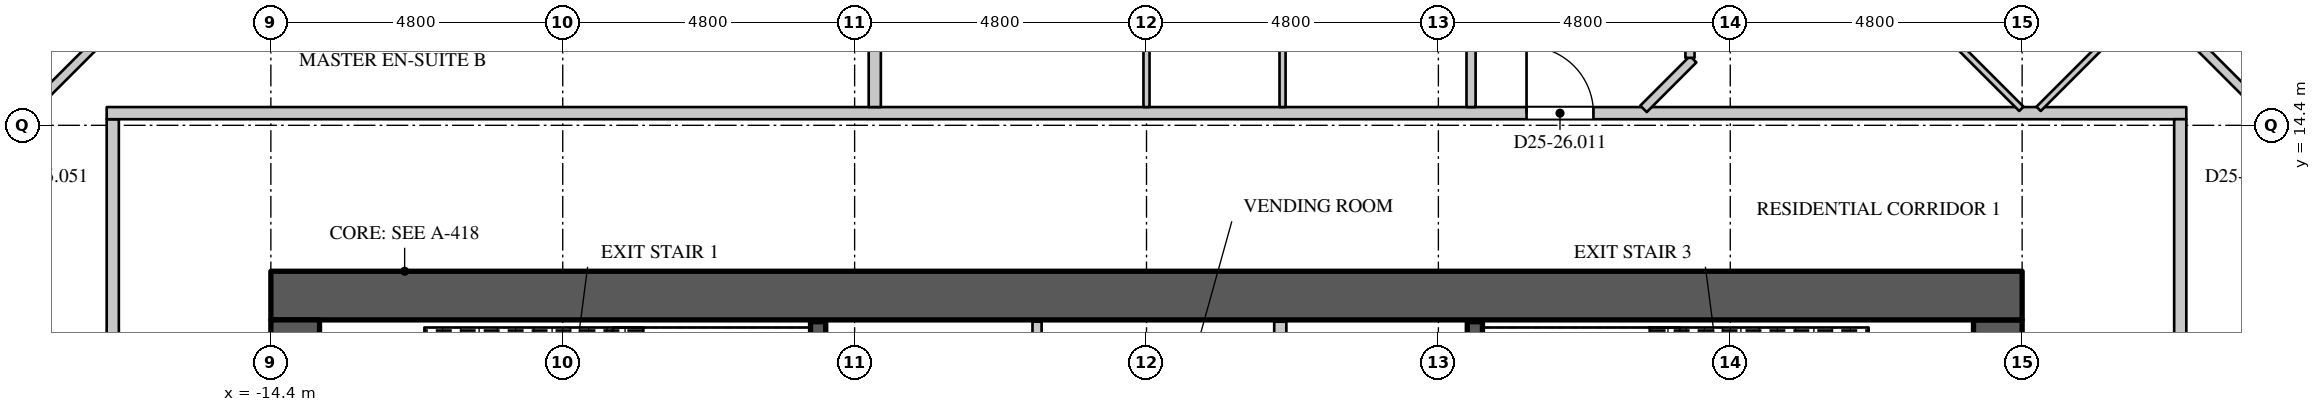
"""IFC4 building model, lengths in metres.
Left out: names, types, materials, properties, quantities, classifications, styles, units other than length and angle.
Written with IfcOpenShell. Run it as: python <this file> out.ifc"""

import sys

from ifc_helpers import new_model, si_unit, direction, frame, frame_2d, origin, place, context, subcontext, project, spatial, rectangle, extrude, element, fill, save


model = new_model("IFC4")
c1 = context("Model", 3, precision=1e-05, world=origin(), true_north=direction((0.0, 1.0)))
c2 = subcontext(c1, "Body", "Model", "MODEL_VIEW")
j1 = project(units=[si_unit("LENGTHUNIT", "METRE"), si_unit("PLANEANGLEUNIT", "RADIAN")], contexts=[c1])
p1 = place(None, origin())
s1 = spatial("IfcSite", under=j1, at=p1, CompositionType="ELEMENT")
p2 = place(p1, origin())
s2 = spatial("IfcBuilding", under=s1, at=p2, CompositionType="ELEMENT")
p3 = place(p2, frame((0.0, 0.0, 110.7)))
s3 = spatial("IfcBuildingStorey", under=s2, at=p3, CompositionType="ELEMENT", Elevation=110.7)
p4 = place(p3, frame((-14.4, 11.6, 0.0), z_axis=(0.0, 0.0, 1.0), x_axis=(1.0, 0.0, 0.0)))
e1 = element("IfcWall", 1, at=p4, inside=s3, PredefinedType="SHEAR", context=c2, shape_type="SweptSolid", body=[
    extrude(rectangle(XDim=28.8, YDim=0.8, at=frame_2d((14.4, 0.0))), origin(), (0.0, 0.0, 1.0), 4.2),
])
p5 = place(p3, frame((14.0, -11.2, 0.0), z_axis=(0.0, 0.0, 1.0), x_axis=(0.0, 1.0, 0.0)))
e2 = element("IfcWall", 2, at=p5, inside=s3, PredefinedType="SHEAR", context=c2, shape_type="SweptSolid", body=[
    extrude(rectangle(XDim=22.4, YDim=0.8, at=frame_2d((11.2, 0.0))), origin(), (0.0, 0.0, 1.0), 4.2),
])
p6 = place(p5, frame((20.25, 0.0, 0.0)))
e3 = element("IfcOpeningElement", 3, at=p6, cuts=e2, PredefinedType="OPENING", context=c2, shape_type="SweptSolid", body=[
    extrude(rectangle(XDim=1.1, YDim=2.2, at=frame_2d((0.55, 1.1))), frame((0.0, 0.41, 0.0), z_axis=(0.0, -1.0, 0.0), x_axis=(1.0, 0.0, 0.0)), (0.0, 0.0, 1.0), 0.82),
])
p7 = place(p5, frame((1.05, 0.0, 0.0)))
e4 = element("IfcOpeningElement", 4, at=p7, cuts=e2, PredefinedType="OPENING", context=c2, shape_type="SweptSolid", body=[
    extrude(rectangle(XDim=1.1, YDim=2.2, at=frame_2d((0.55, 1.1))), frame((0.0, 0.41, 0.0), z_axis=(0.0, -1.0, 0.0), x_axis=(1.0, 0.0, 0.0)), (0.0, 0.0, 1.0), 0.82),
])
p8 = place(p5, frame((14.75, 0.0, 0.0)))
e5 = element("IfcOpeningElement", 5, at=p8, cuts=e2, PredefinedType="OPENING", context=c2, shape_type="SweptSolid", body=[
    extrude(rectangle(XDim=1.5, YDim=2.4, at=frame_2d((0.75, 1.2))), frame((0.0, 0.41, 0.0), z_axis=(0.0, -1.0, 0.0), x_axis=(1.0, 0.0, 0.0)), (0.0, 0.0, 1.0), 0.82),
])
p9 = place(p5, frame((6.15, 0.0, 0.0)))
e6 = element("IfcOpeningElement", 6, at=p9, cuts=e2, PredefinedType="OPENING", context=c2, shape_type="SweptSolid", body=[
    extrude(rectangle(XDim=1.5, YDim=2.4, at=frame_2d((0.75, 1.2))), frame((0.0, 0.41, 0.0), z_axis=(0.0, -1.0, 0.0), x_axis=(1.0, 0.0, 0.0)), (0.0, 0.0, 1.0), 0.82),
])
p10 = place(p3, frame((-14.0, -11.2, 0.0), z_axis=(0.0, 0.0, 1.0), x_axis=(0.0, 1.0, 0.0)))
e7 = element("IfcWall", 7, at=p10, inside=s3, PredefinedType="SHEAR", context=c2, shape_type="SweptSolid", body=[
    extrude(rectangle(XDim=22.4, YDim=0.8, at=frame_2d((11.2, 0.0))), origin(), (0.0, 0.0, 1.0), 4.2),
])
p11 = place(p10, frame((20.25, 0.0, 0.0)))
e8 = element("IfcOpeningElement", 8, at=p11, cuts=e7, PredefinedType="OPENING", context=c2, shape_type="SweptSolid", body=[
    extrude(rectangle(XDim=1.1, YDim=2.2, at=frame_2d((0.55, 1.1))), frame((0.0, 0.41, 0.0), z_axis=(0.0, -1.0, 0.0), x_axis=(1.0, 0.0, 0.0)), (0.0, 0.0, 1.0), 0.82),
])
p12 = place(p10, frame((1.05, 0.0, 0.0)))
e9 = element("IfcOpeningElement", 9, at=p12, cuts=e7, PredefinedType="OPENING", context=c2, shape_type="SweptSolid", body=[
    extrude(rectangle(XDim=1.1, YDim=2.2, at=frame_2d((0.55, 1.1))), frame((0.0, 0.41, 0.0), z_axis=(0.0, -1.0, 0.0), x_axis=(1.0, 0.0, 0.0)), (0.0, 0.0, 1.0), 0.82),
])
p13 = place(p10, frame((15.95, 0.0, 0.0)))
e10 = element("IfcOpeningElement", 10, at=p13, cuts=e7, PredefinedType="OPENING", context=c2, shape_type="SweptSolid", body=[
    extrude(rectangle(XDim=1.5, YDim=2.4, at=frame_2d((0.75, 1.2))), frame((0.0, 0.41, 0.0), z_axis=(0.0, -1.0, 0.0), x_axis=(1.0, 0.0, 0.0)), (0.0, 0.0, 1.0), 0.82),
])
p14 = place(p10, frame((4.95, 0.0, 0.0)))
e11 = element("IfcOpeningElement", 11, at=p14, cuts=e7, PredefinedType="OPENING", context=c2, shape_type="SweptSolid", body=[
    extrude(rectangle(XDim=1.5, YDim=2.4, at=frame_2d((0.75, 1.2))), frame((0.0, 0.41, 0.0), z_axis=(0.0, -1.0, 0.0), x_axis=(1.0, 0.0, 0.0)), (0.0, 0.0, 1.0), 0.82),
])
p15 = place(p3, frame((-17.0, -14.5, 0.0), z_axis=(0.0, 0.0, 1.0), x_axis=(0.0, 1.0, 0.0)))
e12 = element("IfcWall", 12, at=p15, inside=s3, PredefinedType="PARTITIONING", context=c2, shape_type="SweptSolid", body=[
    extrude(rectangle(XDim=29.0, YDim=0.2, at=frame_2d((14.5, 0.0))), origin(), (0.0, 0.0, 1.0), 3.95),
])
p16 = place(p15, frame((11.5, 0.0, 0.0)))
e13 = element("IfcOpeningElement", 13, at=p16, cuts=e12, PredefinedType="OPENING", context=c2, shape_type="SweptSolid", body=[
    extrude(rectangle(XDim=1.1, YDim=2.4, at=frame_2d((0.55, 1.2))), frame((0.0, 0.11, 0.0), z_axis=(0.0, -1.0, 0.0), x_axis=(1.0, 0.0, 0.0)), (0.0, 0.0, 1.0), 0.22),
])
p17 = place(p3, frame((-17.1, 14.6, 0.0), z_axis=(0.0, 0.0, 1.0), x_axis=(1.0, 0.0, 0.0)))
e14 = element("IfcWall", 14, at=p17, inside=s3, PredefinedType="PARTITIONING", context=c2, shape_type="SweptSolid", body=[
    extrude(rectangle(XDim=34.2, YDim=0.2, at=frame_2d((17.1, 0.0))), origin(), (0.0, 0.0, 1.0), 3.95),
])
p18 = place(p17, frame((23.35, 0.0, 0.0)))
e15 = element("IfcOpeningElement", 15, at=p18, cuts=e14, PredefinedType="OPENING", context=c2, shape_type="SweptSolid", body=[
    extrude(rectangle(XDim=1.1, YDim=2.4, at=frame_2d((0.55, 1.2))), frame((0.0, 0.11, 0.0), z_axis=(0.0, -1.0, 0.0), x_axis=(1.0, 0.0, 0.0)), (0.0, 0.0, 1.0), 0.22),
])
p19 = place(p3, frame((17.0, -14.5, 0.0), z_axis=(0.0, 0.0, 1.0), x_axis=(0.0, 1.0, 0.0)))
e16 = element("IfcWall", 16, at=p19, inside=s3, PredefinedType="PARTITIONING", context=c2, shape_type="SweptSolid", body=[
    extrude(rectangle(XDim=29.0, YDim=0.2, at=frame_2d((14.5, 0.0))), origin(), (0.0, 0.0, 1.0), 3.95),
])
p20 = place(p19, frame((11.55, 0.0, 0.0)))
e17 = element("IfcOpeningElement", 17, at=p20, cuts=e16, PredefinedType="OPENING", context=c2, shape_type="SweptSolid", body=[
    extrude(rectangle(XDim=1.1, YDim=2.4, at=frame_2d((0.55, 1.2))), frame((0.0, 0.11, 0.0), z_axis=(0.0, -1.0, 0.0), x_axis=(1.0, 0.0, 0.0)), (0.0, 0.0, 1.0), 0.22),
])
p21 = place(p3, frame((-21.547, 11.471, 0.0), z_axis=(0.0, 0.0, 1.0), x_axis=(0.707106781187, 0.707106781187, 0.0)))
e18 = element("IfcWall", 18, at=p21, inside=s3, PredefinedType="PARTITIONING", context=c2, shape_type="SweptSolid", body=[
    extrude(rectangle(XDim=7.05, YDim=0.15, at=frame_2d((3.525, 0.0))), origin(), (0.0, 0.0, 1.0), 3.95),
])
p22 = place(p21, frame((2.85, 0.0, 0.0)))
e19 = element("IfcOpeningElement", 19, at=p22, cuts=e18, PredefinedType="OPENING", context=c2, shape_type="SweptSolid", body=[
    extrude(rectangle(XDim=0.95, YDim=2.2, at=frame_2d((0.475, 1.1))), frame((0.0, 0.085, 0.0), z_axis=(0.0, -1.0, 0.0), x_axis=(1.0, 0.0, 0.0)), (0.0, 0.0, 1.0), 0.17),
])
p23 = place(p3, frame((-1.8, 5.9, 0.0), z_axis=(0.0, 0.0, 1.0), x_axis=(0.0, 1.0, 0.0)))
e20 = element("IfcWall", 20, at=p23, inside=s3, PredefinedType="PARTITIONING", context=c2, shape_type="SweptSolid", body=[
    extrude(rectangle(XDim=5.27, YDim=0.15, at=frame_2d((2.635, 0.0))), origin(), (0.0, 0.0, 1.0), 3.95),
])
p24 = place(p3, frame((5.337, 14.7, 0.0), z_axis=(0.0, 0.0, 1.0), x_axis=(0.0, 1.0, 0.0)))
e21 = element("IfcWall", 21, at=p24, inside=s3, PredefinedType="PARTITIONING", context=c2, shape_type="SweptSolid", body=[
    extrude(rectangle(XDim=6.025, YDim=0.15, at=frame_2d((3.013, 0.0))), origin(), (0.0, 0.0, 1.0), 3.95),
])
p25 = place(p24, frame((2.55, 0.0, 0.0)))
e22 = element("IfcOpeningElement", 22, at=p25, cuts=e21, PredefinedType="OPENING", context=c2, shape_type="SweptSolid", body=[
    extrude(rectangle(XDim=0.95, YDim=2.2, at=frame_2d((0.475, 1.1))), frame((0.0, 0.085, 0.0), z_axis=(0.0, -1.0, 0.0), x_axis=(1.0, 0.0, 0.0)), (0.0, 0.0, 1.0), 0.17),
])
p26 = place(p3, frame((8.174, 14.671, 0.0), z_axis=(0.0, 0.0, 1.0), x_axis=(0.707106781187, 0.707106781187, 0.0)))
e23 = element("IfcWall", 23, at=p26, inside=s3, PredefinedType="PARTITIONING", context=c2, shape_type="SweptSolid", body=[
    extrude(rectangle(XDim=1.155, YDim=0.15, at=frame_2d((0.578, 0.0))), origin(), (0.0, 0.0, 1.0), 3.95),
])
p27 = place(p3, frame((8.937, 15.509, 0.0), z_axis=(0.0, 0.0, 1.0), x_axis=(0.0, 1.0, 0.0)))
e24 = element("IfcWall", 24, at=p27, inside=s3, PredefinedType="PARTITIONING", context=c2, shape_type="SweptSolid", body=[
    extrude(rectangle(XDim=10.946, YDim=0.15, at=frame_2d((5.473, 0.0))), origin(), (0.0, 0.0, 1.0), 3.95),
])
p28 = place(p27, frame((2.1, 0.0, 0.0)))
e25 = element("IfcOpeningElement", 25, at=p28, cuts=e24, PredefinedType="OPENING", context=c2, shape_type="SweptSolid", body=[
    extrude(rectangle(XDim=0.95, YDim=2.2, at=frame_2d((0.475, 1.1))), frame((0.0, 0.085, 0.0), z_axis=(0.0, -1.0, 0.0), x_axis=(1.0, 0.0, 0.0)), (0.0, 0.0, 1.0), 0.17),
])
p29 = place(p27, frame((7.75, 0.0, 0.0)))
e26 = element("IfcOpeningElement", 26, at=p29, cuts=e24, PredefinedType="OPENING", context=c2, shape_type="SweptSolid", body=[
    extrude(rectangle(XDim=1.5, YDim=2.2, at=frame_2d((0.75, 1.1))), frame((0.0, 0.085, 0.0), z_axis=(0.0, -1.0, 0.0), x_axis=(1.0, 0.0, 0.0)), (0.0, 0.0, 1.0), 0.17),
])
p30 = place(p3, frame((16.562, 16.456, 0.0), z_axis=(0.0, 0.0, 1.0), x_axis=(0.707123735134, -0.707089826832, 0.0)))
e27 = element("IfcWall", 27, at=p30, inside=s3, PredefinedType="PARTITIONING", context=c2, shape_type="SweptSolid", body=[
    extrude(rectangle(XDim=7.2, YDim=0.15, at=frame_2d((3.6, 0.0))), origin(), (0.0, 0.0, 1.0), 3.95),
])
p31 = place(p30, frame((3.25, 0.0, 0.0)))
e28 = element("IfcOpeningElement", 28, at=p31, cuts=e27, PredefinedType="OPENING", context=c2, shape_type="SweptSolid", body=[
    extrude(rectangle(XDim=0.95, YDim=2.2, at=frame_2d((0.475, 1.1))), frame((0.0, 0.085, 0.0), z_axis=(0.0, -1.0, 0.0), x_axis=(1.0, 0.0, 0.0)), (0.0, 0.0, 1.0), 0.17),
])
p32 = place(p3, frame((-4.469, 14.7, 0.0), z_axis=(0.0, 0.0, 1.0), x_axis=(0.0, 1.0, 0.0)))
e29 = element("IfcWall", 29, at=p32, inside=s3, PredefinedType="PARTITIONING", context=c2, shape_type="SweptSolid", body=[
    extrude(rectangle(XDim=10.95, YDim=0.2, at=frame_2d((5.475, 0.0))), origin(), (0.0, 0.0, 1.0), 3.3),
])
p33 = place(p3, frame((2.2, 5.9, 0.0), z_axis=(0.0, 0.0, 1.0), x_axis=(0.0, 1.0, 0.0)))
e30 = element("IfcWall", 30, at=p33, inside=s3, PredefinedType="PARTITIONING", context=c2, shape_type="SweptSolid", body=[
    extrude(rectangle(XDim=5.27, YDim=0.2, at=frame_2d((2.635, 0.0))), origin(), (0.0, 0.0, 1.0), 3.95),
])
for number, where, z_axis, x_axis in (
    (31, (-5.4, 8.325, 0.0), (0.0, 0.0, 1.0), (0.0, 1.0, 0.0)),
    (32, (5.4, 8.325, 0.0), (0.0, 0.0, 1.0), (0.0, 1.0, 0.0)),
):
    element("IfcWall", number, at=place(p3, frame(where, z_axis=z_axis, x_axis=x_axis)), inside=s3, PredefinedType="SHEAR", context=c2, shape_type="SweptSolid", body=[
        extrude(rectangle(XDim=2.845, YDim=0.25, at=frame_2d((1.422, 0.0))), origin(), (0.0, 0.0, 1.0), 3.95),
    ])
p34 = place(p3, frame((0.0, 14.7, 0.0), z_axis=(0.0, 0.0, 1.0), x_axis=(0.0, 1.0, 0.0)))
e33 = element("IfcWall", 33, at=p34, inside=s3, PredefinedType="PARTITIONING", context=c2, shape_type="SweptSolid", body=[
    extrude(rectangle(XDim=6.12, YDim=0.1, at=frame_2d((3.06, 0.0))), origin(), (0.0, 0.0, 1.0), 3.95),
])
p35 = place(p34, frame((2.55, 0.0, 0.0)))
e34 = element("IfcOpeningElement", 34, at=p35, cuts=e33, PredefinedType="OPENING", context=c2, shape_type="SweptSolid", body=[
    extrude(rectangle(XDim=0.9, YDim=2.2, at=frame_2d((0.45, 1.1))), frame((0.0, 0.06, 0.0), z_axis=(0.0, -1.0, 0.0), x_axis=(1.0, 0.0, 0.0)), (0.0, 0.0, 1.0), 0.12),
])
p36 = place(p3, frame((2.237, 14.7, 0.0), z_axis=(0.0, 0.0, 1.0), x_axis=(0.0, 1.0, 0.0)))
e35 = element("IfcWall", 35, at=p36, inside=s3, PredefinedType="PARTITIONING", context=c2, shape_type="SweptSolid", body=[
    extrude(rectangle(XDim=6.025, YDim=0.1, at=frame_2d((3.013, 0.0))), origin(), (0.0, 0.0, 1.0), 3.95),
])
p37 = place(p3, frame((12.726, 16.332, 0.0), z_axis=(0.0, 0.0, 1.0), x_axis=(0.707106781187, -0.707106781187, 0.0)))
e36 = element("IfcWall", 36, at=p37, inside=s3, PredefinedType="PARTITIONING", context=c2, shape_type="SweptSolid", body=[
    extrude(rectangle(XDim=2.35, YDim=0.1, at=frame_2d((1.175, 0.0))), origin(), (0.0, 0.0, 1.0), 3.95),
])
p38 = place(p3, frame((14.671, 14.671, 0.0), z_axis=(0.0, 0.0, 1.0), x_axis=(0.707106781187, 0.707106781187, 0.0)))
e37 = element("IfcWall", 37, at=p38, inside=s3, PredefinedType="PARTITIONING", context=c2, shape_type="SweptSolid", body=[
    extrude(rectangle(XDim=1.979, YDim=0.1, at=frame_2d((0.99, 0.0))), origin(), (0.0, 0.0, 1.0), 3.95),
])
p39 = place(p18, origin())
e38 = element("IfcDoor", 38, at=p39, inside=s3, OperationType="SINGLE_SWING_LEFT", PredefinedType="DOOR", context=c2, shape_type="SweptSolid", body=[
    extrude(rectangle(XDim=1.1, YDim=2.4, at=frame_2d((0.55, 1.2))), frame((0.0, 0.025, 0.0), z_axis=(0.0, -1.0, 0.0), x_axis=(1.0, 0.0, 0.0)), (0.0, 0.0, 1.0), 0.05),
])
fill(e15, e38)
save(model, sys.argv[1])
